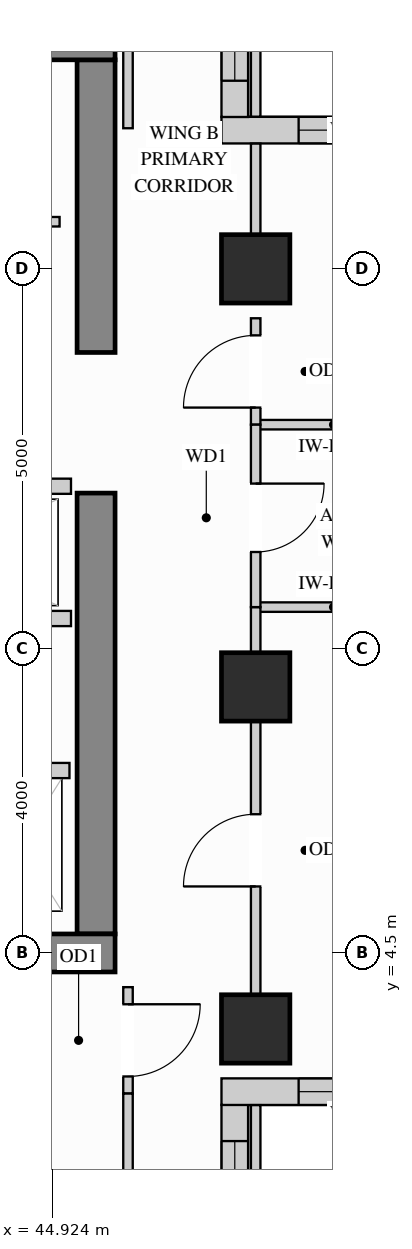
"""IFC4 building model, lengths in metres.
Left out: names, types, materials, properties, quantities, classifications, styles, units other than length and angle.
Written with IfcOpenShell. Run it as: python <this file> out.ifc"""

import sys

from ifc_helpers import new_model, si_unit, direction, frame, frame_2d, origin, origin_2d, place, context, subcontext, project, spatial, rectangle, extrude, source, transform, mapped, element, fill, save


model = new_model("IFC4")
c1 = context("Model", 3, precision=1e-05, world=origin(), true_north=direction((0.0, 1.0)))
c2 = subcontext(c1, "Body", "Model", "MODEL_VIEW")
j1 = project(units=[si_unit("LENGTHUNIT", "METRE"), si_unit("PLANEANGLEUNIT", "RADIAN")], contexts=[c1])
p1 = place(None, origin())
s1 = spatial("IfcSite", under=j1, at=p1, CompositionType="ELEMENT")
p2 = place(p1, origin())
s2 = spatial("IfcBuilding", under=s1, at=p2, CompositionType="ELEMENT")
p3 = place(p2, frame((0.0, 0.0, 219.6)))
s3 = spatial("IfcBuildingStorey", under=s2, at=p3, CompositionType="ELEMENT", Elevation=219.6)
m1 = source(origin(), c2, "Body", "SweptSolid", [
    extrude(rectangle(XDim=0.9, YDim=0.9, at=origin_2d()), origin(), (0.0, 0.0, 1.0), 3.4),
])
for number, where, z_axis, x_axis in (
    (1, (47.6, 13.5, 0.0), (0.0, 0.0, 1.0), (1.0, 0.0, 0.0)),
    (2, (47.6, 3.5, 0.0), (0.0, 0.0, 1.0), (1.0, 0.0, 0.0)),
    (3, (47.6, 8.0, 0.0), (0.0, 0.0, 1.0), (1.0, 0.0, 0.0)),
):
    element("IfcColumn", number, at=place(p3, frame(where, z_axis=z_axis, x_axis=x_axis)), inside=s3, PredefinedType="COLUMN", context=c2, shape_type="MappedRepresentation", body=[
        mapped(m1, transform((0.0, 0.0, 0.0), x_axis=(1.0, 0.0, 0.0), y_axis=(0.0, 1.0, 0.0), z_axis=(0.0, 0.0, 1.0))),
    ])
m2 = source(origin(), c2, "Body", "SweptSolid", [
    extrude(rectangle(XDim=5.8, YDim=0.5, at=frame_2d((2.9, 0.0))), origin(), (0.0, 0.0, 1.0), 3.4),
])
p4 = place(p3, frame((45.5, 4.75, 0.0), z_axis=(0.0, 0.0, 1.0), x_axis=(0.0, 1.0, 0.0)))
e4 = element("IfcWall", 4, at=p4, inside=s3, PredefinedType="SHEAR", context=c2, shape_type="MappedRepresentation", body=[
    mapped(m2, transform((0.0, 0.0, 0.0), x_axis=(1.0, 0.0, 0.0), y_axis=(0.0, 1.0, 0.0), z_axis=(0.0, 0.0, 1.0))),
])
m3 = source(origin(), c2, "Body", "SweptSolid", [
    extrude(rectangle(XDim=3.85, YDim=0.5, at=frame_2d((1.925, 0.0))), origin(), (0.0, 0.0, 1.0), 3.4),
])
p5 = place(p3, frame((45.5, 12.4, 0.0), z_axis=(0.0, 0.0, 1.0), x_axis=(0.0, 1.0, 0.0)))
e5 = element("IfcWall", 5, at=p5, inside=s3, PredefinedType="SHEAR", context=c2, shape_type="MappedRepresentation", body=[
    mapped(m3, transform((0.0, 0.0, 0.0), x_axis=(1.0, 0.0, 0.0), y_axis=(0.0, 1.0, 0.0), z_axis=(0.0, 0.0, 1.0))),
])
m4 = source(origin(), c2, "Body", "SweptSolid", [
    extrude(rectangle(XDim=10.0, YDim=0.5, at=frame_2d((5.0, 0.0))), origin(), (0.0, 0.0, 1.0), 3.4),
])
for number, where, z_axis, x_axis in (
    (6, (35.75, 16.5, 0.0), (0.0, 0.0, 1.0), (1.0, 0.0, 0.0)),
    (7, (35.75, 4.5, 0.0), (0.0, 0.0, 1.0), (1.0, 0.0, 0.0)),
):
    element("IfcWall", number, at=place(p3, frame(where, z_axis=z_axis, x_axis=x_axis)), inside=s3, PredefinedType="SHEAR", context=c2, shape_type="MappedRepresentation", body=[
        mapped(m4, transform((0.0, 0.0, 0.0), x_axis=(1.0, 0.0, 0.0), y_axis=(0.0, 1.0, 0.0), z_axis=(0.0, 0.0, 1.0))),
    ])
p6 = place(p3, frame((47.325, 0.348, 0.0), z_axis=(0.0, 0.0, 1.0), x_axis=(0.0, 1.0, 0.0)))
e8 = element("IfcWall", 8, at=p6, inside=s3, PredefinedType="SOLIDWALL", context=c2, shape_type="SweptSolid", body=[
    extrude(rectangle(XDim=2.154, YDim=0.35, at=frame_2d((1.077, 0.0))), origin(), (0.0, 0.0, 1.0), 3.385),
])
p7 = place(p6, frame((0.477, 0.0, 0.78)))
e9 = element("IfcOpeningElement", 9, at=p7, cuts=e8, PredefinedType="OPENING", context=c2, shape_type="SweptSolid", body=[
    extrude(rectangle(XDim=1.2, YDim=2.1, at=frame_2d((0.6, 1.05))), frame((0.0, 0.185, 0.0), z_axis=(0.0, -1.0, 0.0), x_axis=(1.0, 0.0, 0.0)), (0.0, 0.0, 1.0), 0.37),
])
p8 = place(p3, frame((47.15, 2.675, 0.0), z_axis=(0.0, 0.0, 1.0), x_axis=(1.0, 0.0, 0.0)))
e10 = element("IfcWall", 10, at=p8, inside=s3, PredefinedType="SOLIDWALL", context=c2, shape_type="SweptSolid", body=[
    extrude(rectangle(XDim=2.85, YDim=0.35, at=frame_2d((1.425, 0.0))), origin(), (0.0, 0.0, 1.0), 3.385),
])
p9 = place(p8, frame((1.015, 0.0, 0.78)))
e11 = element("IfcOpeningElement", 11, at=p9, cuts=e10, PredefinedType="OPENING", context=c2, shape_type="SweptSolid", body=[
    extrude(rectangle(XDim=1.2, YDim=2.1, at=frame_2d((0.6, 1.05))), frame((0.0, 0.185, 0.0), z_axis=(0.0, -1.0, 0.0), x_axis=(1.0, 0.0, 0.0)), (0.0, 0.0, 1.0), 0.37),
])
p10 = place(p3, frame((50.0, 15.325, 0.0), z_axis=(0.0, 0.0, 1.0), x_axis=(-1.0, 0.0, 0.0)))
e12 = element("IfcWall", 12, at=p10, inside=s3, PredefinedType="SOLIDWALL", context=c2, shape_type="SweptSolid", body=[
    extrude(rectangle(XDim=2.85, YDim=0.35, at=frame_2d((1.425, 0.0))), origin(), (0.0, 0.0, 1.0), 3.385),
])
p11 = place(p10, frame((0.635, 0.0, 0.78)))
e13 = element("IfcOpeningElement", 13, at=p11, cuts=e12, PredefinedType="OPENING", context=c2, shape_type="SweptSolid", body=[
    extrude(rectangle(XDim=1.2, YDim=2.1, at=frame_2d((0.6, 1.05))), frame((0.0, 0.185, 0.0), z_axis=(0.0, -1.0, 0.0), x_axis=(1.0, 0.0, 0.0)), (0.0, 0.0, 1.0), 0.37),
])
p12 = place(p3, frame((47.325, 15.498, 0.0), z_axis=(0.0, 0.0, 1.0), x_axis=(0.0, 1.0, 0.0)))
e14 = element("IfcWall", 14, at=p12, inside=s3, PredefinedType="SOLIDWALL", context=c2, shape_type="SweptSolid", body=[
    extrude(rectangle(XDim=2.154, YDim=0.35, at=frame_2d((1.077, 0.0))), origin(), (0.0, 0.0, 1.0), 3.385),
])
p13 = place(p12, frame((0.477, 0.0, 0.78)))
e15 = element("IfcOpeningElement", 15, at=p13, cuts=e14, PredefinedType="OPENING", context=c2, shape_type="SweptSolid", body=[
    extrude(rectangle(XDim=1.2, YDim=2.1, at=frame_2d((0.6, 1.05))), frame((0.0, 0.185, 0.0), z_axis=(0.0, -1.0, 0.0), x_axis=(1.0, 0.0, 0.0)), (0.0, 0.0, 1.0), 0.37),
])
p14 = place(p3, frame((41.8, 14.12, 0.0), z_axis=(0.0, 0.0, 1.0), x_axis=(1.0, 0.0, 0.0)))
e16 = element("IfcWall", 16, at=p14, inside=s3, PredefinedType="PARTITIONING", context=c2, shape_type="SweptSolid", body=[
    extrude(rectangle(XDim=3.22, YDim=0.125, at=frame_2d((1.61, 0.0))), origin(), (0.0, 0.0, 1.0), 3.385),
])
p15 = place(p14, frame((1.135, 0.0, 0.0)))
e17 = element("IfcOpeningElement", 17, at=p15, cuts=e16, PredefinedType="OPENING", context=c2, shape_type="SweptSolid", body=[
    extrude(rectangle(XDim=0.85, YDim=2.1, at=frame_2d((0.425, 1.05))), frame((0.0, 0.073, 0.0), z_axis=(0.0, -1.0, 0.0), x_axis=(1.0, 0.0, 0.0)), (0.0, 0.0, 1.0), 0.145),
])
m5 = source(origin(), c2, "Body", "SweptSolid", [
    extrude(rectangle(XDim=2.048, YDim=0.125, at=frame_2d((1.024, 0.0))), origin(), (0.0, 0.0, 1.0), 3.385),
])
for number, where, z_axis, x_axis in (
    (18, (47.6, 11.45, 0.0), (0.0, 0.0, 1.0), (1.0, 0.0, 0.0)),
    (19, (47.6, 9.05, 0.0), (0.0, 0.0, 1.0), (1.0, 0.0, 0.0)),
):
    element("IfcWall", number, at=place(p3, frame(where, z_axis=z_axis, x_axis=x_axis)), inside=s3, PredefinedType="PARTITIONING", context=c2, shape_type="MappedRepresentation", body=[
        mapped(m5, transform((0.0, 0.0, 0.0), x_axis=(1.0, 0.0, 0.0), y_axis=(0.0, 1.0, 0.0), z_axis=(0.0, 0.0, 1.0))),
    ])
p16 = place(p3, frame((47.6, 3.95, 0.0), z_axis=(0.0, 0.0, 1.0), x_axis=(0.0, 1.0, 0.0)))
e20 = element("IfcWall", 20, at=p16, inside=s3, PredefinedType="PARTITIONING", context=c2, shape_type="SweptSolid", body=[
    extrude(rectangle(XDim=3.6, YDim=0.125, at=frame_2d((1.8, 0.0))), origin(), (0.0, 0.0, 1.0), 2.773),
])
p17 = place(p16, frame((1.425, 0.0, 0.0)))
e21 = element("IfcOpeningElement", 21, at=p17, cuts=e20, PredefinedType="OPENING", context=c2, shape_type="SweptSolid", body=[
    extrude(rectangle(XDim=0.95, YDim=2.15, at=frame_2d((0.475, 1.075))), frame((0.0, 0.073, 0.0), z_axis=(0.0, -1.0, 0.0), x_axis=(1.0, 0.0, 0.0)), (0.0, 0.0, 1.0), 0.145),
])
m6 = source(origin(), c2, "Body", "SweptSolid", [
    extrude(rectangle(XDim=0.6, YDim=0.125, at=frame_2d((0.3, 0.0))), origin(), (0.0, 0.0, 1.0), 2.773),
])
p18 = place(p3, frame((47.6, 8.45, 0.0), z_axis=(0.0, 0.0, 1.0), x_axis=(0.0, 1.0, 0.0)))
e22 = element("IfcWall", 22, at=p18, inside=s3, PredefinedType="PARTITIONING", context=c2, shape_type="MappedRepresentation", body=[
    mapped(m6, transform((0.0, 0.0, 0.0), x_axis=(1.0, 0.0, 0.0), y_axis=(0.0, 1.0, 0.0), z_axis=(0.0, 0.0, 1.0))),
])
m7 = source(origin(), c2, "Body", "SweptSolid", [
    extrude(rectangle(XDim=2.148, YDim=0.125, at=frame_2d((1.074, 0.0))), origin(), (0.0, 0.0, 1.0), 3.385),
])
p19 = place(p3, frame((47.6, 0.35, 0.0), z_axis=(0.0, 0.0, 1.0), x_axis=(0.0, 1.0, 0.0)))
e23 = element("IfcWall", 23, at=p19, inside=s3, PredefinedType="PARTITIONING", context=c2, shape_type="MappedRepresentation", body=[
    mapped(m7, transform((0.0, 0.0, 0.0), x_axis=(1.0, 0.0, 0.0), y_axis=(0.0, 1.0, 0.0), z_axis=(0.0, 0.0, 1.0))),
])
p20 = place(p3, frame((47.6, 11.45, 0.0), z_axis=(0.0, 0.0, 1.0), x_axis=(0.0, 1.0, 0.0)))
e24 = element("IfcWall", 24, at=p20, inside=s3, PredefinedType="PARTITIONING", context=c2, shape_type="SweptSolid", body=[
    extrude(rectangle(XDim=1.4, YDim=0.125, at=frame_2d((0.7, 0.0))), origin(), (0.0, 0.0, 1.0), 2.773),
])
p21 = place(p20, frame((0.225, 0.0, 0.0)))
e25 = element("IfcOpeningElement", 25, at=p21, cuts=e24, PredefinedType="OPENING", context=c2, shape_type="SweptSolid", body=[
    extrude(rectangle(XDim=0.95, YDim=2.15, at=frame_2d((0.475, 1.075))), frame((0.0, 0.073, 0.0), z_axis=(0.0, -1.0, 0.0), x_axis=(1.0, 0.0, 0.0)), (0.0, 0.0, 1.0), 0.145),
])
m8 = source(origin(), c2, "Body", "SweptSolid", [
    extrude(rectangle(XDim=1.198, YDim=0.125, at=frame_2d((0.599, 0.0))), origin(), (0.0, 0.0, 1.0), 3.385),
])
p22 = place(p3, frame((47.6, 13.95, 0.0), z_axis=(0.0, 0.0, 1.0), x_axis=(0.0, 1.0, 0.0)))
e26 = element("IfcWall", 26, at=p22, inside=s3, PredefinedType="PARTITIONING", context=c2, shape_type="MappedRepresentation", body=[
    mapped(m8, transform((0.0, 0.0, 0.0), x_axis=(1.0, 0.0, 0.0), y_axis=(0.0, 1.0, 0.0), z_axis=(0.0, 0.0, 1.0))),
])
p23 = place(p3, frame((47.6, 15.502, 0.0), z_axis=(0.0, 0.0, 1.0), x_axis=(0.0, 1.0, 0.0)))
e27 = element("IfcWall", 27, at=p23, inside=s3, PredefinedType="PARTITIONING", context=c2, shape_type="MappedRepresentation", body=[
    mapped(m7, transform((0.0, 0.0, 0.0), x_axis=(1.0, 0.0, 0.0), y_axis=(0.0, 1.0, 0.0), z_axis=(0.0, 0.0, 1.0))),
])
p24 = place(p3, frame((47.6, 9.05, 0.0), z_axis=(0.0, 0.0, 1.0), x_axis=(0.0, 1.0, 0.0)))
e28 = element("IfcWall", 28, at=p24, inside=s3, PredefinedType="PARTITIONING", context=c2, shape_type="SweptSolid", body=[
    extrude(rectangle(XDim=2.4, YDim=0.125, at=frame_2d((1.2, 0.0))), origin(), (0.0, 0.0, 1.0), 2.773),
])
p25 = place(p24, frame((0.725, 0.0, 0.0)))
e29 = element("IfcOpeningElement", 29, at=p25, cuts=e28, PredefinedType="OPENING", context=c2, shape_type="SweptSolid", body=[
    extrude(rectangle(XDim=0.9, YDim=2.15, at=frame_2d((0.45, 1.075))), frame((0.0, 0.073, 0.0), z_axis=(0.0, -1.0, 0.0), x_axis=(1.0, 0.0, 0.0)), (0.0, 0.0, 1.0), 0.145),
])
m9 = source(origin(), c2, "Body", "SweptSolid", [
    extrude(rectangle(XDim=2.298, YDim=0.125, at=frame_2d((1.149, 0.0))), origin(), (0.0, 0.0, 1.0), 3.385),
])
p26 = place(p3, frame((45.92, 15.35, 0.0), z_axis=(0.0, 0.0, 1.0), x_axis=(0.0, 1.0, 0.0)))
e30 = element("IfcWall", 30, at=p26, inside=s3, PredefinedType="PARTITIONING", context=c2, shape_type="MappedRepresentation", body=[
    mapped(m9, transform((0.0, 0.0, 0.0), x_axis=(1.0, 0.0, 0.0), y_axis=(0.0, 1.0, 0.0), z_axis=(0.0, 0.0, 1.0))),
])
p27 = place(p3, frame((45.92, 2.65, 0.0), z_axis=(0.0, 0.0, 1.0), x_axis=(0.0, 1.0, 0.0)))
e31 = element("IfcWall", 31, at=p27, inside=s3, PredefinedType="PARTITIONING", context=c2, shape_type="SweptSolid", body=[
    extrude(rectangle(XDim=1.4, YDim=0.125, at=frame_2d((0.7, 0.0))), origin(), (0.0, 0.0, 1.0), 3.385),
])
p28 = place(p27, frame((0.225, 0.0, 0.0)))
e32 = element("IfcOpeningElement", 32, at=p28, cuts=e31, PredefinedType="OPENING", context=c2, shape_type="SweptSolid", body=[
    extrude(rectangle(XDim=0.95, YDim=2.15, at=frame_2d((0.475, 1.075))), frame((0.0, 0.073, 0.0), z_axis=(0.0, -1.0, 0.0), x_axis=(1.0, 0.0, 0.0)), (0.0, 0.0, 1.0), 0.145),
])
p29 = place(p3, frame((45.92, 0.352, 0.0), z_axis=(0.0, 0.0, 1.0), x_axis=(0.0, 1.0, 0.0)))
e33 = element("IfcWall", 33, at=p29, inside=s3, PredefinedType="PARTITIONING", context=c2, shape_type="MappedRepresentation", body=[
    mapped(m9, transform((0.0, 0.0, 0.0), x_axis=(1.0, 0.0, 0.0), y_axis=(0.0, 1.0, 0.0), z_axis=(0.0, 0.0, 1.0))),
])
m10 = source(origin(), c2, "Body", "SweptSolid", [
    extrude(rectangle(XDim=1.3, YDim=0.2, at=frame_2d((0.65, 0.0))), origin(), (0.0, 0.0, 1.0), 3.385),
])
p30 = place(p3, frame((43.85, 6.9, 0.0), z_axis=(0.0, 0.0, 1.0), x_axis=(1.0, 0.0, 0.0)))
e34 = element("IfcWall", 34, at=p30, inside=s3, PredefinedType="PARTITIONING", context=c2, shape_type="MappedRepresentation", body=[
    mapped(m10, transform((0.0, 0.0, 0.0), x_axis=(1.0, 0.0, 0.0), y_axis=(0.0, 1.0, 0.0), z_axis=(0.0, 0.0, 1.0))),
])
m11 = source(origin(), c2, "Body", "SweptSolid", [
    extrude(rectangle(XDim=3.49, YDim=0.2, at=frame_2d((1.745, 0.0))), origin(), (0.0, 0.0, 1.0), 3.385),
])
for number, where, z_axis, x_axis in (
    (35, (41.68, 10.64, 0.0), (0.0, 0.0, 1.0), (1.0, 0.0, 0.0)),
    (36, (41.68, 8.9, 0.0), (0.0, 0.0, 1.0), (1.0, 0.0, 0.0)),
):
    element("IfcWall", number, at=place(p3, frame(where, z_axis=z_axis, x_axis=x_axis)), inside=s3, PredefinedType="PARTITIONING", context=c2, shape_type="MappedRepresentation", body=[
        mapped(m11, transform((0.0, 0.0, 0.0), x_axis=(1.0, 0.0, 0.0), y_axis=(0.0, 1.0, 0.0), z_axis=(0.0, 0.0, 1.0))),
    ])
m12 = source(origin(), c2, "Body", "SweptSolid", [
    extrude(rectangle(XDim=0.95, YDim=2.15, at=frame_2d((0.475, 1.075))), frame((0.0, 0.025, 0.0), z_axis=(0.0, -1.0, 0.0), x_axis=(1.0, 0.0, 0.0)), (0.0, 0.0, 1.0), 0.05),
])
p31 = place(p28, origin())
e37 = element("IfcDoor", 37, at=p31, inside=s3, OperationType="SINGLE_SWING_RIGHT", PredefinedType="DOOR", context=c2, shape_type="MappedRepresentation", body=[
    mapped(m12, transform((0.0, 0.0, 0.0), x_axis=(1.0, 0.0, 0.0), y_axis=(0.0, 1.0, 0.0), z_axis=(0.0, 0.0, 1.0))),
])
fill(e32, e37)
p32 = place(p17, origin())
e38 = element("IfcDoor", 38, at=p32, inside=s3, OperationType="SINGLE_SWING_LEFT", PredefinedType="DOOR", context=c2, shape_type="MappedRepresentation", body=[
    mapped(m12, transform((0.0, 0.0, 0.0), x_axis=(1.0, 0.0, 0.0), y_axis=(0.0, 1.0, 0.0), z_axis=(0.0, 0.0, 1.0))),
])
fill(e21, e38)
p33 = place(p21, origin())
e39 = element("IfcDoor", 39, at=p33, inside=s3, OperationType="SINGLE_SWING_LEFT", PredefinedType="DOOR", context=c2, shape_type="MappedRepresentation", body=[
    mapped(m12, transform((0.0, 0.0, 0.0), x_axis=(1.0, 0.0, 0.0), y_axis=(0.0, 1.0, 0.0), z_axis=(0.0, 0.0, 1.0))),
])
fill(e25, e39)
m13 = source(origin(), c2, "Body", "SweptSolid", [
    extrude(rectangle(XDim=0.9, YDim=2.15, at=frame_2d((0.45, 1.075))), frame((0.0, 0.025, 0.0), z_axis=(0.0, -1.0, 0.0), x_axis=(1.0, 0.0, 0.0)), (0.0, 0.0, 1.0), 0.05),
])
p34 = place(p25, origin())
e40 = element("IfcDoor", 40, at=p34, inside=s3, OperationType="SINGLE_SWING_RIGHT", PredefinedType="DOOR", context=c2, shape_type="MappedRepresentation", body=[
    mapped(m13, transform((0.0, 0.0, 0.0), x_axis=(1.0, 0.0, 0.0), y_axis=(0.0, 1.0, 0.0), z_axis=(0.0, 0.0, 1.0))),
])
fill(e29, e40)
m14 = source(origin(), c2, "Body", "SweptSolid", [
    extrude(rectangle(XDim=1.2, YDim=2.1, at=frame_2d((0.6, 1.05))), frame((0.0, 0.03, 0.0), z_axis=(0.0, -1.0, 0.0), x_axis=(1.0, 0.0, 0.0)), (0.0, 0.0, 1.0), 0.06),
])
p35 = place(p7, origin())
e41 = element("IfcWindow", 41, at=p35, inside=s3, PartitioningType="SINGLE_PANEL", PredefinedType="WINDOW", context=c2, shape_type="MappedRepresentation", body=[
    mapped(m14, transform((0.0, 0.0, 0.0), x_axis=(1.0, 0.0, 0.0), y_axis=(0.0, 1.0, 0.0), z_axis=(0.0, 0.0, 1.0))),
])
fill(e9, e41)
p36 = place(p9, origin())
e42 = element("IfcWindow", 42, at=p36, inside=s3, PartitioningType="SINGLE_PANEL", PredefinedType="WINDOW", context=c2, shape_type="MappedRepresentation", body=[
    mapped(m14, transform((0.0, 0.0, 0.0), x_axis=(1.0, 0.0, 0.0), y_axis=(0.0, 1.0, 0.0), z_axis=(0.0, 0.0, 1.0))),
])
fill(e11, e42)
p37 = place(p11, origin())
e43 = element("IfcWindow", 43, at=p37, inside=s3, PartitioningType="SINGLE_PANEL", PredefinedType="WINDOW", context=c2, shape_type="MappedRepresentation", body=[
    mapped(m14, transform((0.0, 0.0, 0.0), x_axis=(1.0, 0.0, 0.0), y_axis=(0.0, 1.0, 0.0), z_axis=(0.0, 0.0, 1.0))),
])
fill(e13, e43)
p38 = place(p13, origin())
e44 = element("IfcWindow", 44, at=p38, inside=s3, PartitioningType="SINGLE_PANEL", PredefinedType="WINDOW", context=c2, shape_type="MappedRepresentation", body=[
    mapped(m14, transform((0.0, 0.0, 0.0), x_axis=(1.0, 0.0, 0.0), y_axis=(0.0, 1.0, 0.0), z_axis=(0.0, 0.0, 1.0))),
])
fill(e15, e44)
save(model, sys.argv[1])
